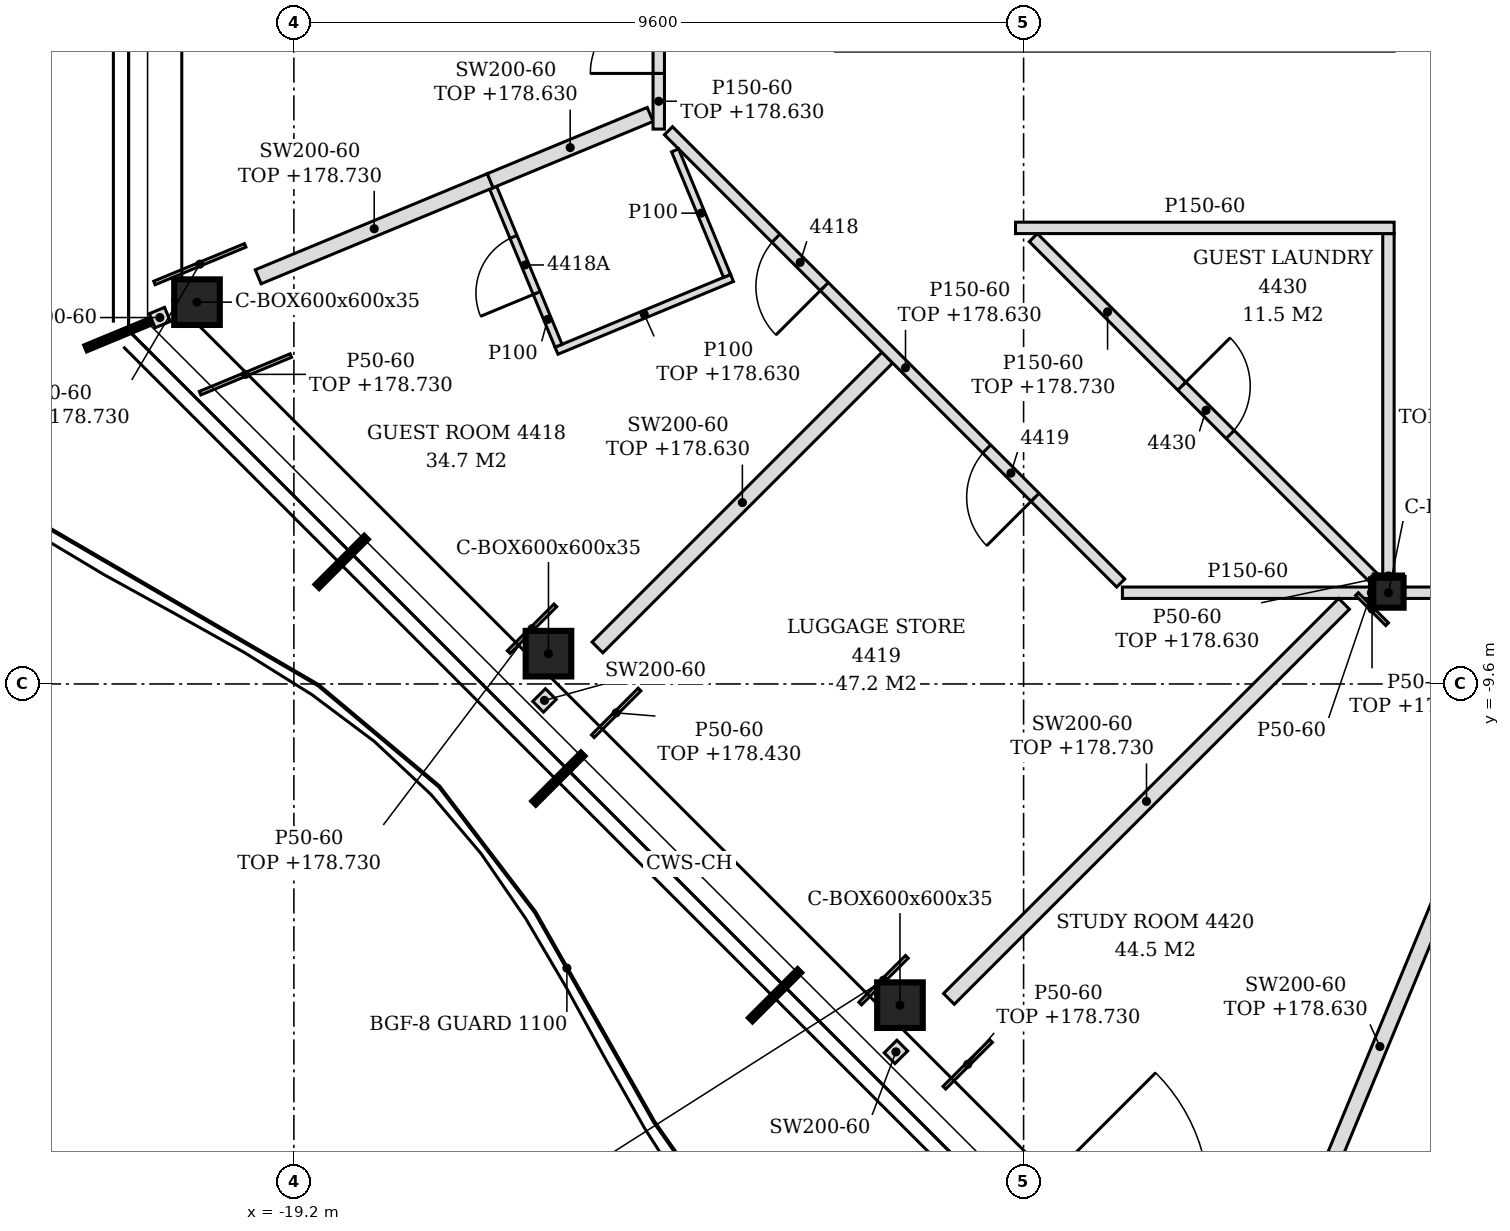
"""IFC4 building model, lengths in metres.
Left out: names, types, materials, properties, quantities, classifications, styles, units other than length and angle.
Written with IfcOpenShell. Run it as: python <this file> out.ifc"""

import sys

from ifc_helpers import new_model, si_unit, direction, frame, frame_2d, origin, origin_2d, place, context, subcontext, project, spatial, polyline, rectangle, hollow_rectangle, i_section, outline, extrude, clip, halfspace, element, fill, save


model = new_model("IFC4")
c1 = context("Model", 3, precision=1e-05, world=origin(), true_north=direction((0.0, 1.0)))
c2 = subcontext(c1, "Body", "Model", "MODEL_VIEW")
j1 = project(units=[si_unit("LENGTHUNIT", "METRE"), si_unit("PLANEANGLEUNIT", "RADIAN")], contexts=[c1])
p1 = place(None, origin())
s1 = spatial("IfcSite", under=j1, at=p1, CompositionType="ELEMENT")
p2 = place(p1, origin())
s2 = spatial("IfcBuilding", under=s1, at=p2, CompositionType="ELEMENT")
p3 = place(p2, frame((0.0, 0.0, 175.8)))
s3 = spatial("IfcBuildingStorey", under=s2, at=p3, CompositionType="ELEMENT", Elevation=175.8)
for number, where, z_axis, x_axis in (
    (1, (-20.475, -4.577, -0.15), (0.183, -0.122, 0.976), (0.555, 0.832, 0.0)),
    (2, (-15.851, -9.201, -0.15), (0.183, -0.122, 0.976), (0.555, 0.832, 0.0)),
    (3, (-11.227, -13.826, -0.15), (0.183, -0.122, 0.976), (0.555, 0.832, 0.0)),
):
    element("IfcColumn", number, at=place(p3, frame(where, z_axis=z_axis, x_axis=x_axis)), inside=s3, PredefinedType="COLUMN", context=c2, shape_type="Clipping", body=[
        clip(clip(extrude(hollow_rectangle(XDim=0.6, YDim=0.6, WallThickness=0.035, at=origin_2d()), origin(), (0.0, 0.0, 1.0), 3.69), halfspace(frame((0.0, 0.0, 0.022), z_axis=(0.0, 0.0, 1.0), x_axis=(1.0, 0.0, 0.0)), True)), halfspace(frame((0.0, 0.0, 3.67), z_axis=(0.0, 0.0, 1.0), x_axis=(1.0, 0.0, 0.0)), False)),
    ])
p4 = place(p3, frame((-4.8, -8.4, -0.15), z_axis=(0.0, 0.0, 1.0), x_axis=(1.0, 0.0, 0.0)))
e4 = element("IfcColumn", 4, at=p4, inside=s3, PredefinedType="COLUMN", context=c2, shape_type="SweptSolid", body=[
    extrude(i_section(OverallWidth=0.399, OverallDepth=0.393, WebThickness=0.023, FlangeThickness=0.037, FilletRadius=0.015, at=origin_2d()), origin(), (0.0, 0.0, 1.0), 3.6),
])
p5 = place(p3, frame((-6.467, -18.123, 0.0), z_axis=(0.0, 0.0, 1.0), x_axis=(0.382668510089, 0.923885713379, 0.0)))
e5 = element("IfcWall", 5, at=p5, inside=s3, PredefinedType="PARTITIONING", context=c2, shape_type="SweptSolid", body=[
    extrude(rectangle(XDim=8.124, YDim=0.2, at=frame_2d((4.062, 0.0))), origin(), (0.0, 0.0, 1.0), 2.83),
])
p6 = place(p3, frame((-11.363, -14.524, 0.0), z_axis=(0.0, 0.0, 1.0), x_axis=(0.70762537781, 0.706587803942, 0.0)))
e6 = element("IfcWall", 6, at=p6, inside=s3, PredefinedType="PARTITIONING", context=c2, shape_type="SweptSolid", body=[
    extrude(rectangle(XDim=0.235, YDim=0.2, at=frame_2d((0.118, 0.0))), origin(), (0.0, 0.0, 1.0), 3.45),
])
p7 = place(p3, frame((-10.583, -13.743, 0.0), z_axis=(0.0, 0.0, 1.0), x_axis=(0.707173198016, 0.707040358118, 0.0)))
e7 = element("IfcWall", 7, at=p7, inside=s3, PredefinedType="PARTITIONING", context=c2, shape_type="SweptSolid", body=[
    extrude(rectangle(XDim=7.351, YDim=0.2, at=frame_2d((3.676, 0.0))), origin(), (0.0, 0.0, 1.0), 2.93),
])
p8 = place(p3, frame((-15.987, -9.9, 0.0), z_axis=(0.0, 0.0, 1.0), x_axis=(0.707106781187, 0.707106781187, 0.0)))
e8 = element("IfcWall", 8, at=p8, inside=s3, PredefinedType="PARTITIONING", context=c2, shape_type="SweptSolid", body=[
    extrude(rectangle(XDim=0.235, YDim=0.2, at=frame_2d((0.118, 0.0))), origin(), (0.0, 0.0, 1.0), 3.45),
])
p9 = place(p3, frame((-15.206, -9.119, 0.0), z_axis=(0.0, 0.0, 1.0), x_axis=(0.70719733142, 0.707016219356, 0.0)))
e9 = element("IfcWall", 9, at=p9, inside=s3, PredefinedType="PARTITIONING", context=c2, shape_type="SweptSolid", body=[
    extrude(rectangle(XDim=5.392, YDim=0.2, at=frame_2d((2.696, 0.0))), origin(), (0.0, 0.0, 1.0), 2.83),
])
p10 = place(p3, frame((-8.3, -8.4, 0.0), z_axis=(0.0, 0.0, 1.0), x_axis=(1.0, 0.0, 0.0)))
e10 = element("IfcWall", 10, at=p10, inside=s3, PredefinedType="PARTITIONING", context=c2, shape_type="SweptSolid", body=[
    extrude(rectangle(XDim=3.301, YDim=0.15, at=frame_2d((1.65, 0.0))), origin(), (0.0, 0.0, 1.0), 3.45),
])
p11 = place(p3, frame((-4.601, -8.4, 0.0), z_axis=(0.0, 0.0, 1.0), x_axis=(1.0, 0.0, 0.0)))
e11 = element("IfcWall", 11, at=p11, inside=s3, PredefinedType="PARTITIONING", context=c2, shape_type="SweptSolid", body=[
    extrude(rectangle(XDim=11.601, YDim=0.15, at=frame_2d((5.801, 0.0))), origin(), (0.0, 0.0, 1.0), 2.83),
])
p12 = place(p11, frame((0.531, 0.0, 0.0)))
e12 = element("IfcOpeningElement", 12, at=p12, cuts=e11, PredefinedType="OPENING", context=c2, shape_type="SweptSolid", body=[
    extrude(rectangle(XDim=0.9, YDim=2.1, at=frame_2d((0.45, 1.05))), frame((0.0, 0.085, 0.0), z_axis=(0.0, -1.0, 0.0), x_axis=(1.0, 0.0, 0.0)), (0.0, 0.0, 1.0), 0.17),
])
p13 = place(p11, frame((3.093, 0.0, 0.0)))
e13 = element("IfcOpeningElement", 13, at=p13, cuts=e11, PredefinedType="OPENING", context=c2, shape_type="SweptSolid", body=[
    extrude(rectangle(XDim=0.9, YDim=2.1, at=frame_2d((0.45, 1.05))), frame((0.0, 0.085, 0.0), z_axis=(0.0, -1.0, 0.0), x_axis=(1.0, 0.0, 0.0)), (0.0, 0.0, 1.0), 0.17),
])
p14 = place(p11, frame((5.855, 0.0, 0.0)))
e14 = element("IfcOpeningElement", 14, at=p14, cuts=e11, PredefinedType="OPENING", context=c2, shape_type="SweptSolid", body=[
    extrude(rectangle(XDim=0.9, YDim=2.1, at=frame_2d((0.45, 1.05))), frame((0.0, 0.085, 0.0), z_axis=(0.0, -1.0, 0.0), x_axis=(1.0, 0.0, 0.0)), (0.0, 0.0, 1.0), 0.17),
])
p15 = place(p3, frame((-8.322, -8.272, 0.0), z_axis=(0.0, 0.0, 1.0), x_axis=(-0.707106781187, 0.707106781187, 0.0)))
e15 = element("IfcWall", 15, at=p15, inside=s3, PredefinedType="PARTITIONING", context=c2, shape_type="SweptSolid", body=[
    extrude(rectangle(XDim=8.415, YDim=0.15, at=frame_2d((4.207, 0.0))), origin(), (0.0, 0.0, 1.0), 2.83),
])
p16 = place(p15, frame((5.515, 0.0, 0.0)))
e16 = element("IfcOpeningElement", 16, at=p16, cuts=e15, PredefinedType="OPENING", context=c2, shape_type="SweptSolid", body=[
    extrude(rectangle(XDim=0.9, YDim=2.1, at=frame_2d((0.45, 1.05))), frame((0.0, 0.085, 0.0), z_axis=(0.0, -1.0, 0.0), x_axis=(1.0, 0.0, 0.0)), (0.0, 0.0, 1.0), 0.17),
])
p17 = place(p15, frame((1.594, 0.0, 0.0)))
e17 = element("IfcOpeningElement", 17, at=p17, cuts=e15, PredefinedType="OPENING", context=c2, shape_type="SweptSolid", body=[
    extrude(rectangle(XDim=0.9, YDim=2.1, at=frame_2d((0.45, 1.05))), frame((0.0, 0.085, 0.0), z_axis=(0.0, -1.0, 0.0), x_axis=(1.0, 0.0, 0.0)), (0.0, 0.0, 1.0), 0.17),
])
p18 = place(p3, frame((-4.998, -8.202, 0.0), z_axis=(0.0, 0.0, 1.0), x_axis=(-0.707106781187, 0.707106781187, 0.0)))
e18 = element("IfcWall", 18, at=p18, inside=s3, PredefinedType="PARTITIONING", context=c2, shape_type="SweptSolid", body=[
    extrude(rectangle(XDim=6.327, YDim=0.15, at=frame_2d((3.164, 0.0))), origin(), (0.0, 0.0, 1.0), 2.93),
])
p19 = place(p18, frame((2.664, 0.0, 0.0)))
e19 = element("IfcOpeningElement", 19, at=p19, cuts=e18, PredefinedType="OPENING", context=c2, shape_type="SweptSolid", body=[
    extrude(rectangle(XDim=0.9, YDim=2.1, at=frame_2d((0.45, 1.05))), frame((0.0, 0.085, 0.0), z_axis=(0.0, -1.0, 0.0), x_axis=(1.0, 0.0, 0.0)), (0.0, 0.0, 1.0), 0.17),
])
p20 = place(p3, frame((-4.8, -8.204, 0.0), z_axis=(0.0, 0.0, 1.0), x_axis=(0.0, 1.0, 0.0)))
e20 = element("IfcWall", 20, at=p20, inside=s3, PredefinedType="PARTITIONING", context=c2, shape_type="SweptSolid", body=[
    extrude(rectangle(XDim=4.529, YDim=0.15, at=frame_2d((2.264, 0.0))), origin(), (0.0, 0.0, 1.0), 2.83),
])
p21 = place(p3, frame((-15.745, -5.216, 0.0), z_axis=(0.0, 0.0, 1.0), x_axis=(0.923777505624, 0.38292965425, 0.0)))
e21 = element("IfcWall", 21, at=p21, inside=s3, PredefinedType="PARTITIONING", context=c2, shape_type="SweptSolid", body=[
    extrude(rectangle(XDim=2.5, YDim=0.1, at=frame_2d((1.25, 0.0))), origin(), (0.0, 0.0, 1.0), 2.83),
])
p22 = place(p3, frame((-15.718, -5.151, 0.0), z_axis=(0.0, 0.0, 1.0), x_axis=(-0.382380536126, 0.924004938078, 0.0)))
e22 = element("IfcWall", 22, at=p22, inside=s3, PredefinedType="PARTITIONING", context=c2, shape_type="SweptSolid", body=[
    extrude(rectangle(XDim=2.251, YDim=0.1, at=frame_2d((1.125, 0.0))), origin(), (0.0, 0.0, 1.0), 3.45),
])
p23 = place(p22, frame((0.75, 0.0, 0.0)))
e23 = element("IfcOpeningElement", 23, at=p23, cuts=e22, PredefinedType="OPENING", context=c2, shape_type="SweptSolid", body=[
    extrude(rectangle(XDim=0.8, YDim=2.1, at=frame_2d((0.4, 1.05))), frame((0.0, 0.06, 0.0), z_axis=(0.0, -1.0, 0.0), x_axis=(1.0, 0.0, 0.0)), (0.0, 0.0, 1.0), 0.12),
])
p24 = place(p3, frame((-21.064, -4.821, 0.0), z_axis=(0.0, 0.0, 1.0), x_axis=(0.923674221268, 0.383178721962, 0.0)))
e24 = element("IfcWall", 24, at=p24, inside=s3, PredefinedType="PARTITIONING", context=c2, shape_type="SweptSolid", body=[
    extrude(rectangle(XDim=0.217, YDim=0.2, at=frame_2d((0.109, 0.0))), origin(), (0.0, 0.0, 1.0), 3.45),
])
p25 = place(p3, frame((-19.67, -4.243, 0.0), z_axis=(0.0, 0.0, 1.0), x_axis=(0.923888058455, 0.382662848268, 0.0)))
e25 = element("IfcWall", 25, at=p25, inside=s3, PredefinedType="PARTITIONING", context=c2, shape_type="SweptSolid", body=[
    extrude(rectangle(XDim=3.304, YDim=0.2, at=frame_2d((1.652, 0.0))), origin(), (0.0, 0.0, 1.0), 2.93),
])
p26 = place(p3, frame((-13.501, -4.232, 0.0), z_axis=(0.0, 0.0, 1.0), x_axis=(-0.382528764213, 0.923943582991, 0.0)))
e26 = element("IfcWall", 26, at=p26, inside=s3, PredefinedType="PARTITIONING", context=c2, shape_type="SweptSolid", body=[
    extrude(rectangle(XDim=1.787, YDim=0.1, at=frame_2d((0.894, 0.0))), origin(), (0.0, 0.0, 1.0), 3.45),
])
p27 = place(p3, frame((-9.706, -3.6, 0.0), z_axis=(0.0, 0.0, 1.0), x_axis=(1.0, 0.0, 0.0)))
e27 = element("IfcWall", 27, at=p27, inside=s3, PredefinedType="PARTITIONING", context=c2, shape_type="SweptSolid", body=[
    extrude(outline(polyline([(0.0, 0.0), (4.981, 0.0), (4.981, 2.83), (4.756, 2.83), (4.754, 3.45), (0.0, 3.45), (0.0, 0.0)])), frame((0.0, 0.075, 0.0), z_axis=(0.0, -1.0, 0.0), x_axis=(1.0, 0.0, 0.0)), (0.0, 0.0, 1.0), 0.15),
])
p28 = place(p3, frame((-16.617, -2.979, 0.0), z_axis=(0.0, 0.0, 1.0), x_axis=(0.923927982336, 0.382566443191, 0.0)))
e28 = element("IfcWall", 28, at=p28, inside=s3, PredefinedType="PARTITIONING", context=c2, shape_type="SweptSolid", body=[
    extrude(rectangle(XDim=2.277, YDim=0.2, at=frame_2d((1.138, 0.0))), origin(), (0.0, 0.0, 1.0), 2.83),
])
p29 = place(p3, frame((-14.4, -2.3, 0.0), z_axis=(0.0, 0.0, 1.0), x_axis=(0.0, 1.0, 0.0)))
e29 = element("IfcWall", 29, at=p29, inside=s3, PredefinedType="PARTITIONING", context=c2, shape_type="SweptSolid", body=[
    extrude(rectangle(XDim=2.104, YDim=0.15, at=frame_2d((1.052, 0.0))), origin(), (0.0, 0.0, 1.0), 2.83),
])
p30 = place(p29, frame((0.732, 0.0, 0.0)))
e30 = element("IfcOpeningElement", 30, at=p30, cuts=e29, PredefinedType="OPENING", context=c2, shape_type="SweptSolid", body=[
    extrude(rectangle(XDim=0.9, YDim=2.1, at=frame_2d((0.45, 1.05))), frame((0.0, 0.085, 0.0), z_axis=(0.0, -1.0, 0.0), x_axis=(1.0, 0.0, 0.0)), (0.0, 0.0, 1.0), 0.17),
])
p31 = place(p3, frame((-10.642, -14.911, 0.0), z_axis=(0.0, 0.0, 1.0), x_axis=(0.707106781187, 0.707106781187, 0.0)))
e31 = element("IfcWall", 31, at=p31, inside=s3, PredefinedType="PARTITIONING", context=c2, shape_type="SweptSolid", body=[
    extrude(rectangle(XDim=0.868, YDim=0.05, at=frame_2d((0.434, 0.0))), origin(), (0.0, 0.0, 1.0), 2.93),
])
p32 = place(p3, frame((-11.75, -13.804, 0.0), z_axis=(0.0, 0.0, 1.0), x_axis=(0.707247373047, 0.706966161367, 0.0)))
e32 = element("IfcWall", 32, at=p32, inside=s3, PredefinedType="PARTITIONING", context=c2, shape_type="SweptSolid", body=[
    extrude(rectangle(XDim=0.868, YDim=0.05, at=frame_2d((0.434, 0.0))), origin(), (0.0, 0.0, 1.0), 2.63),
])
p33 = place(p3, frame((-16.374, -9.18, 0.0), z_axis=(0.0, 0.0, 1.0), x_axis=(0.706966161367, 0.707247373047, 0.0)))
e33 = element("IfcWall", 33, at=p33, inside=s3, PredefinedType="PARTITIONING", context=c2, shape_type="SweptSolid", body=[
    extrude(rectangle(XDim=0.868, YDim=0.05, at=frame_2d((0.434, 0.0))), origin(), (0.0, 0.0, 1.0), 2.93),
])
p34 = place(p3, frame((-15.267, -10.287, 0.0), z_axis=(0.0, 0.0, 1.0), x_axis=(0.707106781187, 0.707106781187, 0.0)))
e34 = element("IfcWall", 34, at=p34, inside=s3, PredefinedType="PARTITIONING", context=c2, shape_type="SweptSolid", body=[
    extrude(rectangle(XDim=0.868, YDim=0.05, at=frame_2d((0.434, 0.0))), origin(), (0.0, 0.0, 1.0), 2.63),
])
p35 = place(p3, frame((-5.0, -8.178, 0.0), z_axis=(0.0, 0.0, 1.0), x_axis=(1.0, 0.0, 0.0)))
e35 = element("IfcWall", 35, at=p35, inside=s3, PredefinedType="PARTITIONING", context=c2, shape_type="SweptSolid", body=[
    extrude(rectangle(XDim=0.399, YDim=0.05, at=frame_2d((0.199, 0.0))), origin(), (0.0, 0.0, 1.0), 2.83),
])
p36 = place(p3, frame((-4.818, -8.814, 0.0), z_axis=(0.0, 0.0, 1.0), x_axis=(-0.707106781187, 0.707106781187, 0.0)))
e36 = element("IfcWall", 36, at=p36, inside=s3, PredefinedType="PARTITIONING", context=c2, shape_type="SweptSolid", body=[
    extrude(rectangle(XDim=0.56, YDim=0.05, at=frame_2d((0.28, 0.0))), origin(), (0.0, 0.0, 1.0), 2.83),
])
p37 = place(p3, frame((-5.024, -8.596, 0.0), z_axis=(0.0, 0.0, 1.0), x_axis=(0.0, 1.0, 0.0)))
e37 = element("IfcWall", 37, at=p37, inside=s3, PredefinedType="PARTITIONING", context=c2, shape_type="SweptSolid", body=[
    extrude(rectangle(XDim=0.393, YDim=0.05, at=frame_2d((0.196, 0.0))), origin(), (0.0, 0.0, 1.0), 3.45),
])
p38 = place(p3, frame((-20.434, -5.774, 0.0), z_axis=(0.0, 0.0, 1.0), x_axis=(0.92388555257, 0.382668898334, 0.0)))
e38 = element("IfcWall", 38, at=p38, inside=s3, PredefinedType="PARTITIONING", context=c2, shape_type="SweptSolid", body=[
    extrude(rectangle(XDim=1.292, YDim=0.05, at=frame_2d((0.646, 0.0))), origin(), (0.0, 0.0, 1.0), 2.93),
])
p39 = place(p3, frame((-21.035, -4.325, 0.0), z_axis=(0.0, 0.0, 1.0), x_axis=(0.923846419958, 0.382763363361, 0.0)))
e39 = element("IfcWall", 39, at=p39, inside=s3, PredefinedType="PARTITIONING", context=c2, shape_type="SweptSolid", body=[
    extrude(rectangle(XDim=1.292, YDim=0.05, at=frame_2d((0.646, 0.0))), origin(), (0.0, 0.0, 1.0), 2.93),
])
p40 = place(p30, origin())
e40 = element("IfcDoor", 40, at=p40, inside=s3, OperationType="SINGLE_SWING_LEFT", PredefinedType="DOOR", context=c2, shape_type="SweptSolid", body=[
    extrude(rectangle(XDim=0.9, YDim=2.1, at=frame_2d((0.45, 1.05))), frame((0.0, 0.025, 0.0), z_axis=(0.0, -1.0, 0.0), x_axis=(1.0, 0.0, 0.0)), (0.0, 0.0, 1.0), 0.05),
])
fill(e30, e40)
p41 = place(p16, origin())
e41 = element("IfcDoor", 41, at=p41, inside=s3, OperationType="SINGLE_SWING_LEFT", PredefinedType="DOOR", context=c2, shape_type="SweptSolid", body=[
    extrude(rectangle(XDim=0.9, YDim=2.1, at=frame_2d((0.45, 1.05))), frame((0.0, 0.025, 0.0), z_axis=(0.0, -1.0, 0.0), x_axis=(1.0, 0.0, 0.0)), (0.0, 0.0, 1.0), 0.05),
])
fill(e16, e41)
p42 = place(p23, origin())
e42 = element("IfcDoor", 42, at=p42, inside=s3, OperationType="SINGLE_SWING_LEFT", PredefinedType="DOOR", context=c2, shape_type="SweptSolid", body=[
    extrude(rectangle(XDim=0.8, YDim=2.1, at=frame_2d((0.4, 1.05))), frame((0.0, 0.025, 0.0), z_axis=(0.0, -1.0, 0.0), x_axis=(1.0, 0.0, 0.0)), (0.0, 0.0, 1.0), 0.05),
])
fill(e23, e42)
p43 = place(p17, origin())
e43 = element("IfcDoor", 43, at=p43, inside=s3, OperationType="SINGLE_SWING_LEFT", PredefinedType="DOOR", context=c2, shape_type="SweptSolid", body=[
    extrude(rectangle(XDim=0.9, YDim=2.1, at=frame_2d((0.45, 1.05))), frame((0.0, 0.025, 0.0), z_axis=(0.0, -1.0, 0.0), x_axis=(1.0, 0.0, 0.0)), (0.0, 0.0, 1.0), 0.05),
])
fill(e17, e43)
p44 = place(p19, frame((0.9, 0.0, 0.0), z_axis=(0.0, 0.0, 1.0), x_axis=(-1.0, 0.0, 0.0)))
e44 = element("IfcDoor", 44, at=p44, inside=s3, OperationType="SINGLE_SWING_LEFT", PredefinedType="DOOR", context=c2, shape_type="SweptSolid", body=[
    extrude(rectangle(XDim=0.9, YDim=2.1, at=frame_2d((0.45, 1.05))), frame((0.0, 0.025, 0.0), z_axis=(0.0, -1.0, 0.0), x_axis=(1.0, 0.0, 0.0)), (0.0, 0.0, 1.0), 0.05),
])
fill(e19, e44)
save(model, sys.argv[1])
